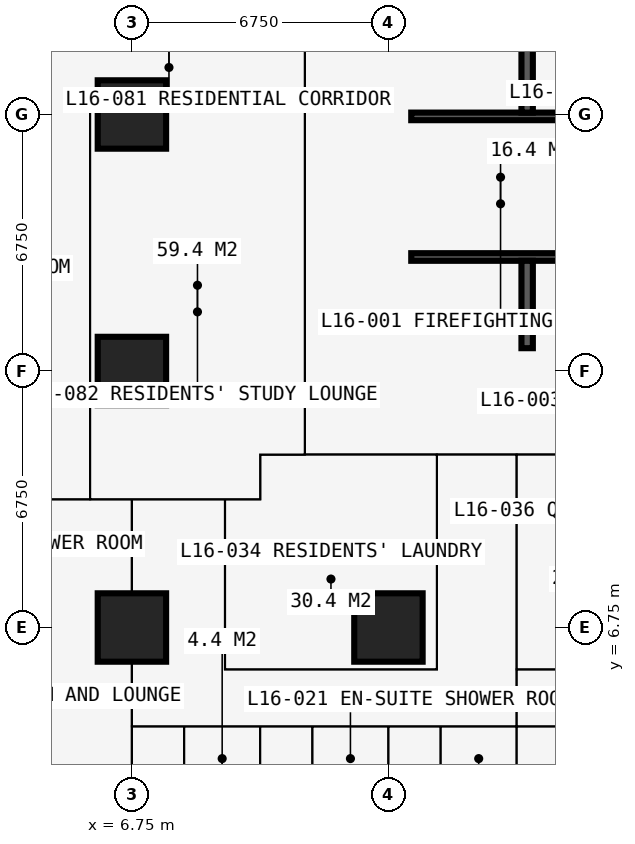
"""IFC4 building model, lengths in metres.
Left out: names, types, materials, properties, quantities, classifications, styles, units other than length and angle.
Written with IfcOpenShell. Run it as: python <this file> out.ifc"""

import sys

from ifc_helpers import new_model, si_unit, direction, frame, frame_2d, origin, origin_2d, place, context, subcontext, project, spatial, rectangle, extrude, element, fill, save


model = new_model("IFC4")
c1 = context("Model", 3, precision=1e-05, world=origin(), true_north=direction((0.0, 1.0)))
c2 = subcontext(c1, "Body", "Model", "MODEL_VIEW")
j1 = project(units=[si_unit("LENGTHUNIT", "METRE"), si_unit("PLANEANGLEUNIT", "RADIAN")], contexts=[c1])
p1 = place(None, origin())
s1 = spatial("IfcSite", under=j1, at=p1, CompositionType="ELEMENT")
p2 = place(p1, origin())
s2 = spatial("IfcBuilding", under=s1, at=p2, CompositionType="ELEMENT")
p3 = place(p2, frame((0.0, 0.0, 61.2)))
s3 = spatial("IfcBuildingStorey", under=s2, at=p3, CompositionType="ELEMENT", Elevation=61.2)
for number, where, z_axis, x_axis in (
    (1, (6.75, 6.75, 0.0), (0.0, 0.0, 1.0), (1.0, 0.0, 0.0)),
    (2, (6.75, 13.5, 0.0), (0.0, 0.0, 1.0), (1.0, 0.0, 0.0)),
    (3, (6.75, 20.25, 0.0), (0.0, 0.0, 1.0), (1.0, 0.0, 0.0)),
    (4, (13.5, 6.75, 0.0), (0.0, 0.0, 1.0), (1.0, 0.0, 0.0)),
):
    element("IfcColumn", number, at=place(p3, frame(where, z_axis=z_axis, x_axis=x_axis)), inside=s3, PredefinedType="COLUMN", context=c2, shape_type="SweptSolid", body=[
        extrude(rectangle(XDim=1.8, YDim=1.8, at=origin_2d()), origin(), (0.0, 0.0, 1.0), 3.6),
    ])
p4 = place(p3, frame((12.9, 13.5, 0.0), z_axis=(0.0, 0.0, 1.0), x_axis=(1.0, 0.0, 0.0)))
e5 = element("IfcWall", 5, at=p4, inside=s3, PredefinedType="SHEAR", context=c2, shape_type="SweptSolid", body=[
    extrude(rectangle(XDim=14.7, YDim=1.2, at=frame_2d((7.35, 0.0))), origin(), (0.0, 0.0, 1.0), 3.6),
])
p5 = place(p3, frame((13.5, 26.4, 0.0), z_axis=(0.0, 0.0, 1.0), x_axis=(0.0, -1.0, 0.0)))
e6 = element("IfcWall", 6, at=p5, inside=s3, PredefinedType="SHEAR", context=c2, shape_type="SweptSolid", body=[
    extrude(rectangle(XDim=12.3, YDim=1.2, at=frame_2d((6.15, 0.0))), origin(), (0.0, 0.0, 1.0), 3.6),
])
p6 = place(p5, frame((7.45, 0.0, 0.0)))
e7 = element("IfcOpeningElement", 7, at=p6, cuts=e6, PredefinedType="OPENING", context=c2, shape_type="SweptSolid", body=[
    extrude(rectangle(XDim=1.2, YDim=2.2, at=frame_2d((0.6, 1.1))), frame((0.0, 0.61, 0.0), z_axis=(0.0, -1.0, 0.0), x_axis=(1.0, 0.0, 0.0)), (0.0, 0.0, 1.0), 1.22),
])
p7 = place(p3, frame((14.1, 16.5, 0.0), z_axis=(0.0, 0.0, 1.0), x_axis=(1.0, 0.0, 0.0)))
e8 = element("IfcWall", 8, at=p7, inside=s3, PredefinedType="SHEAR", context=c2, shape_type="SweptSolid", body=[
    extrude(rectangle(XDim=12.3, YDim=0.2, at=frame_2d((6.15, 0.0))), origin(), (0.0, 0.0, 1.0), 3.6),
])
p8 = place(p7, frame((0.9, 0.0, 0.0)))
e9 = element("IfcOpeningElement", 9, at=p8, cuts=e8, PredefinedType="OPENING", context=c2, shape_type="SweptSolid", body=[
    extrude(rectangle(XDim=1.1, YDim=2.2, at=frame_2d((0.55, 1.1))), frame((0.0, 0.11, 0.0), z_axis=(0.0, -1.0, 0.0), x_axis=(1.0, 0.0, 0.0)), (0.0, 0.0, 1.0), 0.22),
])
p9 = place(p7, frame((9.5, 0.0, 0.0)))
e10 = element("IfcOpeningElement", 10, at=p9, cuts=e8, PredefinedType="OPENING", context=c2, shape_type="SweptSolid", body=[
    extrude(rectangle(XDim=1.1, YDim=2.2, at=frame_2d((0.55, 1.1))), frame((0.0, 0.11, 0.0), z_axis=(0.0, -1.0, 0.0), x_axis=(1.0, 0.0, 0.0)), (0.0, 0.0, 1.0), 0.22),
])
p10 = place(p3, frame((14.1, 20.2, 0.0), z_axis=(0.0, 0.0, 1.0), x_axis=(1.0, 0.0, 0.0)))
e11 = element("IfcWall", 11, at=p10, inside=s3, PredefinedType="SHEAR", context=c2, shape_type="SweptSolid", body=[
    extrude(rectangle(XDim=12.3, YDim=0.2, at=frame_2d((6.15, 0.0))), origin(), (0.0, 0.0, 1.0), 3.6),
])
p11 = place(p10, frame((0.35, 0.0, 0.0)))
e12 = element("IfcOpeningElement", 12, at=p11, cuts=e11, PredefinedType="OPENING", context=c2, shape_type="SweptSolid", body=[
    extrude(rectangle(XDim=1.1, YDim=2.2, at=frame_2d((0.55, 1.1))), frame((0.0, 0.11, 0.0), z_axis=(0.0, -1.0, 0.0), x_axis=(1.0, 0.0, 0.0)), (0.0, 0.0, 1.0), 0.22),
])
p12 = place(p10, frame((9.75, 0.0, 0.0)))
e13 = element("IfcOpeningElement", 13, at=p12, cuts=e11, PredefinedType="OPENING", context=c2, shape_type="SweptSolid", body=[
    extrude(rectangle(XDim=1.1, YDim=2.2, at=frame_2d((0.55, 1.1))), frame((0.0, 0.11, 0.0), z_axis=(0.0, -1.0, 0.0), x_axis=(1.0, 0.0, 0.0)), (0.0, 0.0, 1.0), 0.22),
])
p13 = place(p3, frame((17.15, 20.3, 0.0), z_axis=(0.0, 0.0, 1.0), x_axis=(0.0, 1.0, 0.0)))
e14 = element("IfcWall", 14, at=p13, inside=s3, PredefinedType="SHEAR", context=c2, shape_type="SweptSolid", body=[
    extrude(rectangle(XDim=6.1, YDim=0.3, at=frame_2d((3.05, 0.0))), origin(), (0.0, 0.0, 1.0), 3.6),
])
p14 = place(p3, frame((17.15, 14.1, 0.0), z_axis=(0.0, 0.0, 1.0), x_axis=(0.0, 1.0, 0.0)))
e15 = element("IfcWall", 15, at=p14, inside=s3, PredefinedType="SHEAR", context=c2, shape_type="SweptSolid", body=[
    extrude(rectangle(XDim=2.3, YDim=0.3, at=frame_2d((1.15, 0.0))), origin(), (0.0, 0.0, 1.0), 3.6),
])
p15 = place(p3, frame((-0.734, 10.125, 0.0), z_axis=(0.0, 0.0, 1.0), x_axis=(1.0, 0.0, 0.0)))
e16 = element("IfcWall", 16, at=p15, inside=s3, PredefinedType="PARTITIONING", context=c2, shape_type="SweptSolid", body=[
    extrude(rectangle(XDim=10.859, YDim=0.15, at=frame_2d((5.429, 0.0))), origin(), (0.0, 0.0, 1.0), 3.375),
])
p16 = place(p15, frame((5.134, 0.0, 0.0)))
e17 = element("IfcOpeningElement", 17, at=p16, cuts=e16, PredefinedType="OPENING", context=c2, shape_type="SweptSolid", body=[
    extrude(rectangle(XDim=1.0, YDim=2.2, at=frame_2d((0.5, 1.1))), frame((0.0, 0.085, 0.0), z_axis=(0.0, -1.0, 0.0), x_axis=(1.0, 0.0, 0.0)), (0.0, 0.0, 1.0), 0.17),
])
p17 = place(p3, frame((5.65, 10.125, 0.0), z_axis=(0.0, 0.0, 1.0), x_axis=(0.0, 1.0, 0.0)))
e18 = element("IfcWall", 18, at=p17, inside=s3, PredefinedType="PARTITIONING", context=c2, shape_type="SweptSolid", body=[
    extrude(rectangle(XDim=10.762, YDim=0.15, at=frame_2d((5.381, 0.0))), origin(), (0.0, 0.0, 1.0), 3.375),
])
p18 = place(p17, frame((4.9, 0.0, 0.0)))
e19 = element("IfcOpeningElement", 19, at=p18, cuts=e18, PredefinedType="OPENING", context=c2, shape_type="SweptSolid", body=[
    extrude(rectangle(XDim=0.95, YDim=2.2, at=frame_2d((0.475, 1.1))), frame((0.0, 0.085, 0.0), z_axis=(0.0, -1.0, 0.0), x_axis=(1.0, 0.0, 0.0)), (0.0, 0.0, 1.0), 0.17),
])
p19 = place(p3, frame((5.65, 20.887, 0.0), z_axis=(0.0, 0.0, 1.0), x_axis=(1.0, 0.0, 0.0)))
e20 = element("IfcWall", 20, at=p19, inside=s3, PredefinedType="PARTITIONING", context=c2, shape_type="SweptSolid", body=[
    extrude(rectangle(XDim=5.65, YDim=0.15, at=frame_2d((2.825, 0.0))), origin(), (0.0, 0.0, 1.0), 3.375),
])
p20 = place(p3, frame((6.75, -0.734, 0.0), z_axis=(0.0, 0.0, 1.0), x_axis=(0.0, 1.0, 0.0)))
e21 = element("IfcWall", 21, at=p20, inside=s3, PredefinedType="PARTITIONING", context=c2, shape_type="SweptSolid", body=[
    extrude(rectangle(XDim=10.859, YDim=0.15, at=frame_2d((5.429, 0.0))), origin(), (0.0, 0.0, 1.0), 2.877),
])
p21 = place(p3, frame((6.75, 4.15, 0.0), z_axis=(0.0, 0.0, 1.0), x_axis=(1.0, 0.0, 0.0)))
e22 = element("IfcWall", 22, at=p21, inside=s3, PredefinedType="PARTITIONING", context=c2, shape_type="SweptSolid", body=[
    extrude(rectangle(XDim=23.625, YDim=0.1, at=frame_2d((11.812, 0.0))), origin(), (0.0, 0.0, 1.0), 3.375),
])
p22 = place(p21, frame((0.2, 0.0, 0.0)))
e23 = element("IfcOpeningElement", 23, at=p22, cuts=e22, PredefinedType="OPENING", context=c2, shape_type="SweptSolid", body=[
    extrude(rectangle(XDim=0.95, YDim=2.2, at=frame_2d((0.475, 1.1))), frame((0.0, 0.06, 0.0), z_axis=(0.0, -1.0, 0.0), x_axis=(1.0, 0.0, 0.0)), (0.0, 0.0, 1.0), 0.12),
])
p23 = place(p21, frame((3.625, 0.0, 0.0)))
e24 = element("IfcOpeningElement", 24, at=p23, cuts=e22, PredefinedType="OPENING", context=c2, shape_type="SweptSolid", body=[
    extrude(rectangle(XDim=0.95, YDim=2.2, at=frame_2d((0.475, 1.1))), frame((0.0, 0.06, 0.0), z_axis=(0.0, -1.0, 0.0), x_axis=(1.0, 0.0, 0.0)), (0.0, 0.0, 1.0), 0.12),
])
p24 = place(p21, frame((7.0, 0.0, 0.0)))
e25 = element("IfcOpeningElement", 25, at=p24, cuts=e22, PredefinedType="OPENING", context=c2, shape_type="SweptSolid", body=[
    extrude(rectangle(XDim=0.95, YDim=2.2, at=frame_2d((0.475, 1.1))), frame((0.0, 0.06, 0.0), z_axis=(0.0, -1.0, 0.0), x_axis=(1.0, 0.0, 0.0)), (0.0, 0.0, 1.0), 0.12),
])
p25 = place(p21, frame((10.325, 0.0, 0.0)))
e26 = element("IfcOpeningElement", 26, at=p25, cuts=e22, PredefinedType="OPENING", context=c2, shape_type="SweptSolid", body=[
    extrude(rectangle(XDim=0.95, YDim=2.2, at=frame_2d((0.475, 1.1))), frame((0.0, 0.06, 0.0), z_axis=(0.0, -1.0, 0.0), x_axis=(1.0, 0.0, 0.0)), (0.0, 0.0, 1.0), 0.12),
])
p26 = place(p21, frame((13.75, 0.0, 0.0)))
e27 = element("IfcOpeningElement", 27, at=p26, cuts=e22, PredefinedType="OPENING", context=c2, shape_type="SweptSolid", body=[
    extrude(rectangle(XDim=0.95, YDim=2.2, at=frame_2d((0.475, 1.1))), frame((0.0, 0.06, 0.0), z_axis=(0.0, -1.0, 0.0), x_axis=(1.0, 0.0, 0.0)), (0.0, 0.0, 1.0), 0.12),
])
p27 = place(p21, frame((17.125, 0.0, 0.0)))
e28 = element("IfcOpeningElement", 28, at=p27, cuts=e22, PredefinedType="OPENING", context=c2, shape_type="SweptSolid", body=[
    extrude(rectangle(XDim=0.95, YDim=2.2, at=frame_2d((0.475, 1.1))), frame((0.0, 0.06, 0.0), z_axis=(0.0, -1.0, 0.0), x_axis=(1.0, 0.0, 0.0)), (0.0, 0.0, 1.0), 0.12),
])
p28 = place(p21, frame((20.5, 0.0, 0.0)))
e29 = element("IfcOpeningElement", 29, at=p28, cuts=e22, PredefinedType="OPENING", context=c2, shape_type="SweptSolid", body=[
    extrude(rectangle(XDim=0.95, YDim=2.2, at=frame_2d((0.475, 1.1))), frame((0.0, 0.06, 0.0), z_axis=(0.0, -1.0, 0.0), x_axis=(1.0, 0.0, 0.0)), (0.0, 0.0, 1.0), 0.12),
])
p29 = place(p3, frame((8.125, 1.95, 0.0), z_axis=(0.0, 0.0, 1.0), x_axis=(0.0, 1.0, 0.0)))
e30 = element("IfcWall", 30, at=p29, inside=s3, PredefinedType="PARTITIONING", context=c2, shape_type="SweptSolid", body=[
    extrude(rectangle(XDim=2.2, YDim=0.1, at=frame_2d((1.1, 0.0))), origin(), (0.0, 0.0, 1.0), 3.375),
])
p30 = place(p29, frame((0.65, 0.0, 0.0)))
e31 = element("IfcOpeningElement", 31, at=p30, cuts=e30, PredefinedType="OPENING", context=c2, shape_type="SweptSolid", body=[
    extrude(rectangle(XDim=0.9, YDim=2.2, at=frame_2d((0.45, 1.1))), frame((0.0, 0.06, 0.0), z_axis=(0.0, -1.0, 0.0), x_axis=(1.0, 0.0, 0.0)), (0.0, 0.0, 1.0), 0.12),
])
p31 = place(p3, frame((9.2, 5.65, 0.0), z_axis=(0.0, 0.0, 1.0), x_axis=(0.0, 1.0, 0.0)))
e32 = element("IfcWall", 32, at=p31, inside=s3, PredefinedType="PARTITIONING", context=c2, shape_type="SweptSolid", body=[
    extrude(rectangle(XDim=4.475, YDim=0.15, at=frame_2d((2.238, 0.0))), origin(), (0.0, 0.0, 1.0), 3.375),
])
p32 = place(p3, frame((9.2, 5.65, 0.0), z_axis=(0.0, 0.0, 1.0), x_axis=(1.0, 0.0, 0.0)))
e33 = element("IfcWall", 33, at=p32, inside=s3, PredefinedType="PARTITIONING", context=c2, shape_type="SweptSolid", body=[
    extrude(rectangle(XDim=5.575, YDim=0.15, at=frame_2d((2.788, 0.0))), origin(), (0.0, 0.0, 1.0), 3.375),
])
p33 = place(p3, frame((10.125, -0.734, 0.0), z_axis=(0.0, 0.0, 1.0), x_axis=(0.0, 1.0, 0.0)))
e34 = element("IfcWall", 34, at=p33, inside=s3, PredefinedType="PARTITIONING", context=c2, shape_type="SweptSolid", body=[
    extrude(rectangle(XDim=4.884, YDim=0.175, at=frame_2d((2.442, 0.0))), origin(), (0.0, 0.0, 1.0), 3.375),
])
p34 = place(p3, frame((10.125, 10.125, 0.0), z_axis=(0.0, 0.0, 1.0), x_axis=(0.0, 1.0, 0.0)))
e35 = element("IfcWall", 35, at=p34, inside=s3, PredefinedType="PARTITIONING", context=c2, shape_type="SweptSolid", body=[
    extrude(rectangle(XDim=1.175, YDim=0.15, at=frame_2d((0.587, 0.0))), origin(), (0.0, 0.0, 1.0), 3.375),
])
p35 = place(p3, frame((10.125, 11.3, 0.0), z_axis=(0.0, 0.0, 1.0), x_axis=(1.0, 0.0, 0.0)))
e36 = element("IfcWall", 36, at=p35, inside=s3, PredefinedType="PARTITIONING", context=c2, shape_type="SweptSolid", body=[
    extrude(rectangle(XDim=20.675, YDim=0.15, at=frame_2d((10.337, 0.0))), origin(), (0.0, 0.0, 1.0), 3.375),
])
p36 = place(p35, frame((5.2, 0.0, 0.0)))
e37 = element("IfcOpeningElement", 37, at=p36, cuts=e36, PredefinedType="OPENING", context=c2, shape_type="SweptSolid", body=[
    extrude(rectangle(XDim=1.0, YDim=2.2, at=frame_2d((0.5, 1.1))), frame((0.0, 0.085, 0.0), z_axis=(0.0, -1.0, 0.0), x_axis=(1.0, 0.0, 0.0)), (0.0, 0.0, 1.0), 0.17),
])
p37 = place(p35, frame((11.312, 0.0, 0.0)))
e38 = element("IfcOpeningElement", 38, at=p37, cuts=e36, PredefinedType="OPENING", context=c2, shape_type="SweptSolid", body=[
    extrude(rectangle(XDim=1.0, YDim=2.2, at=frame_2d((0.5, 1.1))), frame((0.0, 0.085, 0.0), z_axis=(0.0, -1.0, 0.0), x_axis=(1.0, 0.0, 0.0)), (0.0, 0.0, 1.0), 0.17),
])
p38 = place(p35, frame((2.425, 0.0, 0.0)))
e39 = element("IfcOpeningElement", 39, at=p38, cuts=e36, PredefinedType="OPENING", context=c2, shape_type="SweptSolid", body=[
    extrude(rectangle(XDim=0.95, YDim=2.2, at=frame_2d((0.475, 1.1))), frame((0.0, 0.085, 0.0), z_axis=(0.0, -1.0, 0.0), x_axis=(1.0, 0.0, 0.0)), (0.0, 0.0, 1.0), 0.17),
])
p39 = place(p3, frame((11.3, 11.3, 0.0), z_axis=(0.0, 0.0, 1.0), x_axis=(0.0, 1.0, 0.0)))
e40 = element("IfcWall", 40, at=p39, inside=s3, PredefinedType="PARTITIONING", context=c2, shape_type="SweptSolid", body=[
    extrude(rectangle(XDim=19.075, YDim=0.15, at=frame_2d((9.538, 0.0))), origin(), (0.0, 0.0, 1.0), 3.375),
])
p40 = place(p39, frame((10.137, 0.0, 0.0)))
e41 = element("IfcOpeningElement", 41, at=p40, cuts=e40, PredefinedType="OPENING", context=c2, shape_type="SweptSolid", body=[
    extrude(rectangle(XDim=1.0, YDim=2.2, at=frame_2d((0.5, 1.1))), frame((0.0, 0.085, 0.0), z_axis=(0.0, -1.0, 0.0), x_axis=(1.0, 0.0, 0.0)), (0.0, 0.0, 1.0), 0.17),
])
p41 = place(p3, frame((11.5, 1.95, 0.0), z_axis=(0.0, 0.0, 1.0), x_axis=(0.0, 1.0, 0.0)))
e42 = element("IfcWall", 42, at=p41, inside=s3, PredefinedType="PARTITIONING", context=c2, shape_type="SweptSolid", body=[
    extrude(rectangle(XDim=2.2, YDim=0.1, at=frame_2d((1.1, 0.0))), origin(), (0.0, 0.0, 1.0), 3.375),
])
p42 = place(p41, frame((0.65, 0.0, 0.0)))
e43 = element("IfcOpeningElement", 43, at=p42, cuts=e42, PredefinedType="OPENING", context=c2, shape_type="SweptSolid", body=[
    extrude(rectangle(XDim=0.9, YDim=2.2, at=frame_2d((0.45, 1.1))), frame((0.0, 0.06, 0.0), z_axis=(0.0, -1.0, 0.0), x_axis=(1.0, 0.0, 0.0)), (0.0, 0.0, 1.0), 0.12),
])
p43 = place(p3, frame((13.5, -0.734, 0.0), z_axis=(0.0, 0.0, 1.0), x_axis=(0.0, 1.0, 0.0)))
e44 = element("IfcWall", 44, at=p43, inside=s3, PredefinedType="PARTITIONING", context=c2, shape_type="SweptSolid", body=[
    extrude(rectangle(XDim=4.884, YDim=0.175, at=frame_2d((2.442, 0.0))), origin(), (0.0, 0.0, 1.0), 2.877),
])
p44 = place(p3, frame((14.775, 5.65, 0.0), z_axis=(0.0, 0.0, 1.0), x_axis=(0.0, 1.0, 0.0)))
e45 = element("IfcWall", 45, at=p44, inside=s3, PredefinedType="PARTITIONING", context=c2, shape_type="SweptSolid", body=[
    extrude(rectangle(XDim=5.65, YDim=0.15, at=frame_2d((2.825, 0.0))), origin(), (0.0, 0.0, 1.0), 3.375),
])
p45 = place(p3, frame((14.875, 1.95, 0.0), z_axis=(0.0, 0.0, 1.0), x_axis=(0.0, 1.0, 0.0)))
e46 = element("IfcWall", 46, at=p45, inside=s3, PredefinedType="PARTITIONING", context=c2, shape_type="SweptSolid", body=[
    extrude(rectangle(XDim=2.2, YDim=0.1, at=frame_2d((1.1, 0.0))), origin(), (0.0, 0.0, 1.0), 3.375),
])
p46 = place(p45, frame((0.65, 0.0, 0.0)))
e47 = element("IfcOpeningElement", 47, at=p46, cuts=e46, PredefinedType="OPENING", context=c2, shape_type="SweptSolid", body=[
    extrude(rectangle(XDim=0.9, YDim=2.2, at=frame_2d((0.45, 1.1))), frame((0.0, 0.06, 0.0), z_axis=(0.0, -1.0, 0.0), x_axis=(1.0, 0.0, 0.0)), (0.0, 0.0, 1.0), 0.12),
])
p47 = place(p3, frame((16.875, -0.734, 0.0), z_axis=(0.0, 0.0, 1.0), x_axis=(0.0, 1.0, 0.0)))
e48 = element("IfcWall", 48, at=p47, inside=s3, PredefinedType="PARTITIONING", context=c2, shape_type="SweptSolid", body=[
    extrude(rectangle(XDim=12.034, YDim=0.15, at=frame_2d((6.017, 0.0))), origin(), (0.0, 0.0, 1.0), 3.375),
])
p48 = place(p3, frame((16.875, 5.65, 0.0), z_axis=(0.0, 0.0, 1.0), x_axis=(1.0, 0.0, 0.0)))
e49 = element("IfcWall", 49, at=p48, inside=s3, PredefinedType="PARTITIONING", context=c2, shape_type="SweptSolid", body=[
    extrude(rectangle(XDim=4.012, YDim=0.15, at=frame_2d((2.006, 0.0))), origin(), (0.0, 0.0, 1.0), 3.375),
])
p49 = place(p8, origin())
e50 = element("IfcDoor", 50, at=p49, inside=s3, OperationType="DOUBLE_DOOR_SLIDING", PredefinedType="DOOR", context=c2, shape_type="SweptSolid", body=[
    extrude(rectangle(XDim=1.1, YDim=2.2, at=frame_2d((0.55, 1.1))), frame((0.0, 0.025, 0.0), z_axis=(0.0, -1.0, 0.0), x_axis=(1.0, 0.0, 0.0)), (0.0, 0.0, 1.0), 0.05),
])
fill(e9, e50)
p50 = place(p6, origin())
e51 = element("IfcDoor", 51, at=p50, inside=s3, OperationType="DOUBLE_DOOR_SINGLE_SWING", PredefinedType="DOOR", context=c2, shape_type="SweptSolid", body=[
    extrude(rectangle(XDim=1.2, YDim=2.2, at=frame_2d((0.6, 1.1))), frame((0.0, 0.025, 0.0), z_axis=(0.0, -1.0, 0.0), x_axis=(1.0, 0.0, 0.0)), (0.0, 0.0, 1.0), 0.05),
])
fill(e7, e51)
p51 = place(p11, origin())
e52 = element("IfcDoor", 52, at=p51, inside=s3, OperationType="SINGLE_SWING_LEFT", PredefinedType="DOOR", context=c2, shape_type="SweptSolid", body=[
    extrude(rectangle(XDim=1.1, YDim=2.2, at=frame_2d((0.55, 1.1))), frame((0.0, 0.025, 0.0), z_axis=(0.0, -1.0, 0.0), x_axis=(1.0, 0.0, 0.0)), (0.0, 0.0, 1.0), 0.05),
])
fill(e12, e52)
p52 = place(p16, origin())
e53 = element("IfcDoor", 53, at=p52, inside=s3, OperationType="SINGLE_SWING_LEFT", PredefinedType="DOOR", context=c2, shape_type="SweptSolid", body=[
    extrude(rectangle(XDim=1.0, YDim=2.2, at=frame_2d((0.5, 1.1))), frame((0.0, 0.025, 0.0), z_axis=(0.0, -1.0, 0.0), x_axis=(1.0, 0.0, 0.0)), (0.0, 0.0, 1.0), 0.05),
])
fill(e17, e53)
p53 = place(p22, origin())
e54 = element("IfcDoor", 54, at=p53, inside=s3, OperationType="SINGLE_SWING_LEFT", PredefinedType="DOOR", context=c2, shape_type="SweptSolid", body=[
    extrude(rectangle(XDim=0.95, YDim=2.2, at=frame_2d((0.475, 1.1))), frame((0.0, 0.025, 0.0), z_axis=(0.0, -1.0, 0.0), x_axis=(1.0, 0.0, 0.0)), (0.0, 0.0, 1.0), 0.05),
])
fill(e23, e54)
p54 = place(p30, origin())
e55 = element("IfcDoor", 55, at=p54, inside=s3, OperationType="SINGLE_SWING_RIGHT", PredefinedType="DOOR", context=c2, shape_type="SweptSolid", body=[
    extrude(rectangle(XDim=0.9, YDim=2.2, at=frame_2d((0.45, 1.1))), frame((0.0, 0.025, 0.0), z_axis=(0.0, -1.0, 0.0), x_axis=(1.0, 0.0, 0.0)), (0.0, 0.0, 1.0), 0.05),
])
fill(e31, e55)
p55 = place(p23, origin())
e56 = element("IfcDoor", 56, at=p55, inside=s3, OperationType="SINGLE_SWING_LEFT", PredefinedType="DOOR", context=c2, shape_type="SweptSolid", body=[
    extrude(rectangle(XDim=0.95, YDim=2.2, at=frame_2d((0.475, 1.1))), frame((0.0, 0.025, 0.0), z_axis=(0.0, -1.0, 0.0), x_axis=(1.0, 0.0, 0.0)), (0.0, 0.0, 1.0), 0.05),
])
fill(e24, e56)
p56 = place(p42, origin())
e57 = element("IfcDoor", 57, at=p56, inside=s3, OperationType="SINGLE_SWING_RIGHT", PredefinedType="DOOR", context=c2, shape_type="SweptSolid", body=[
    extrude(rectangle(XDim=0.9, YDim=2.2, at=frame_2d((0.45, 1.1))), frame((0.0, 0.025, 0.0), z_axis=(0.0, -1.0, 0.0), x_axis=(1.0, 0.0, 0.0)), (0.0, 0.0, 1.0), 0.05),
])
fill(e43, e57)
p57 = place(p24, origin())
e58 = element("IfcDoor", 58, at=p57, inside=s3, OperationType="SINGLE_SWING_LEFT", PredefinedType="DOOR", context=c2, shape_type="SweptSolid", body=[
    extrude(rectangle(XDim=0.95, YDim=2.2, at=frame_2d((0.475, 1.1))), frame((0.0, 0.025, 0.0), z_axis=(0.0, -1.0, 0.0), x_axis=(1.0, 0.0, 0.0)), (0.0, 0.0, 1.0), 0.05),
])
fill(e25, e58)
p58 = place(p46, origin())
e59 = element("IfcDoor", 59, at=p58, inside=s3, OperationType="SINGLE_SWING_RIGHT", PredefinedType="DOOR", context=c2, shape_type="SweptSolid", body=[
    extrude(rectangle(XDim=0.9, YDim=2.2, at=frame_2d((0.45, 1.1))), frame((0.0, 0.025, 0.0), z_axis=(0.0, -1.0, 0.0), x_axis=(1.0, 0.0, 0.0)), (0.0, 0.0, 1.0), 0.05),
])
fill(e47, e59)
p59 = place(p36, origin())
e60 = element("IfcDoor", 60, at=p59, inside=s3, OperationType="SINGLE_SWING_LEFT", PredefinedType="DOOR", context=c2, shape_type="SweptSolid", body=[
    extrude(rectangle(XDim=1.0, YDim=2.2, at=frame_2d((0.5, 1.1))), frame((0.0, 0.025, 0.0), z_axis=(0.0, -1.0, 0.0), x_axis=(1.0, 0.0, 0.0)), (0.0, 0.0, 1.0), 0.05),
])
fill(e37, e60)
p60 = place(p25, origin())
e61 = element("IfcDoor", 61, at=p60, inside=s3, OperationType="SINGLE_SWING_LEFT", PredefinedType="DOOR", context=c2, shape_type="SweptSolid", body=[
    extrude(rectangle(XDim=0.95, YDim=2.2, at=frame_2d((0.475, 1.1))), frame((0.0, 0.025, 0.0), z_axis=(0.0, -1.0, 0.0), x_axis=(1.0, 0.0, 0.0)), (0.0, 0.0, 1.0), 0.05),
])
fill(e26, e61)
p61 = place(p38, origin())
e62 = element("IfcDoor", 62, at=p61, inside=s3, OperationType="SINGLE_SWING_LEFT", PredefinedType="DOOR", context=c2, shape_type="SweptSolid", body=[
    extrude(rectangle(XDim=0.95, YDim=2.2, at=frame_2d((0.475, 1.1))), frame((0.0, 0.025, 0.0), z_axis=(0.0, -1.0, 0.0), x_axis=(1.0, 0.0, 0.0)), (0.0, 0.0, 1.0), 0.05),
])
fill(e39, e62)
p62 = place(p40, origin())
e63 = element("IfcDoor", 63, at=p62, inside=s3, OperationType="SINGLE_SWING_LEFT", PredefinedType="DOOR", context=c2, shape_type="SweptSolid", body=[
    extrude(rectangle(XDim=1.0, YDim=2.2, at=frame_2d((0.5, 1.1))), frame((0.0, 0.025, 0.0), z_axis=(0.0, -1.0, 0.0), x_axis=(1.0, 0.0, 0.0)), (0.0, 0.0, 1.0), 0.05),
])
fill(e41, e63)
p63 = place(p18, origin())
e64 = element("IfcDoor", 64, at=p63, inside=s3, OperationType="SINGLE_SWING_LEFT", PredefinedType="DOOR", context=c2, shape_type="SweptSolid", body=[
    extrude(rectangle(XDim=0.95, YDim=2.2, at=frame_2d((0.475, 1.1))), frame((0.0, 0.025, 0.0), z_axis=(0.0, -1.0, 0.0), x_axis=(1.0, 0.0, 0.0)), (0.0, 0.0, 1.0), 0.05),
])
fill(e19, e64)
save(model, sys.argv[1])
